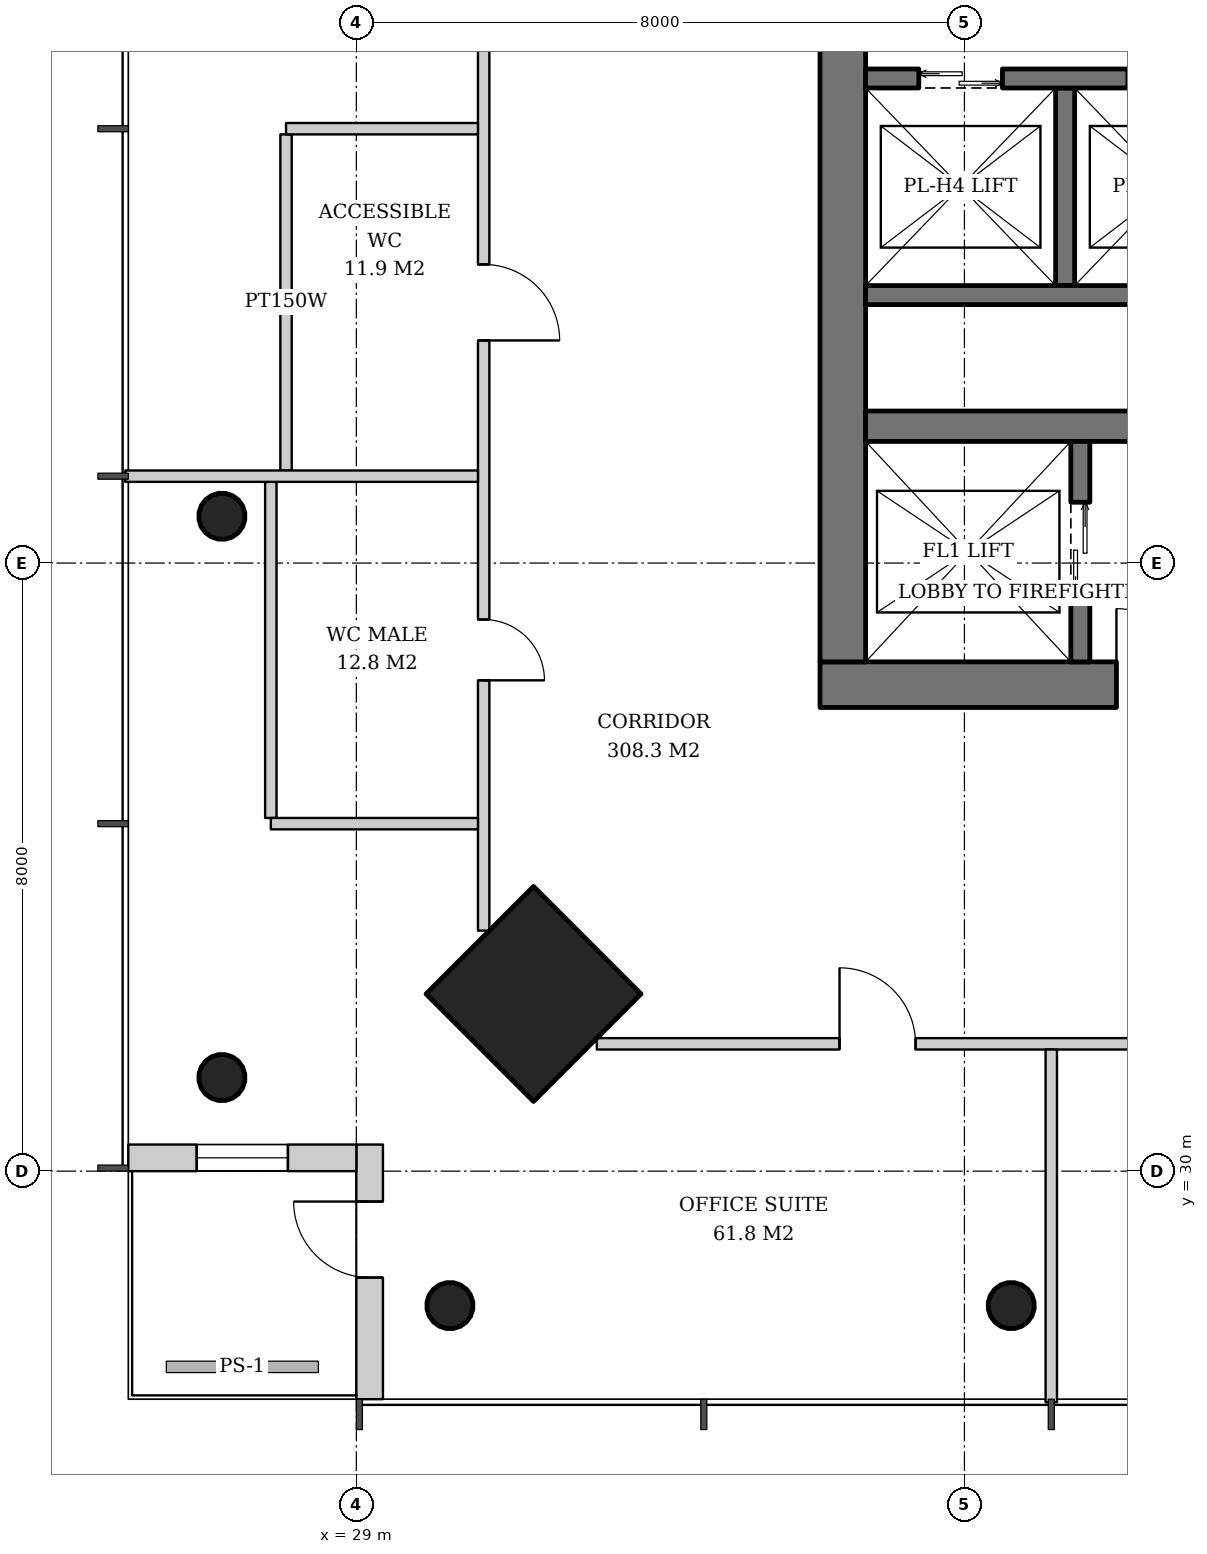
"""IFC4 building model, lengths in metres.
Left out: names, types, materials, properties, quantities, classifications, styles, units other than length and angle.
Written with IfcOpenShell. Run it as: python <this file> out.ifc"""

import sys

from ifc_helpers import new_model, si_unit, direction, frame, frame_2d, origin, origin_2d, place, context, subcontext, project, spatial, rectangle, hollow_circle, extrude, element, fill, save


model = new_model("IFC4")
c1 = context("Model", 3, precision=1e-05, world=origin(), true_north=direction((0.0, 1.0)))
c2 = subcontext(c1, "Body", "Model", "MODEL_VIEW")
j1 = project(units=[si_unit("LENGTHUNIT", "METRE"), si_unit("PLANEANGLEUNIT", "RADIAN")], contexts=[c1])
p1 = place(None, origin())
s1 = spatial("IfcSite", under=j1, at=p1, CompositionType="ELEMENT")
p2 = place(p1, origin())
s2 = spatial("IfcBuilding", under=s1, at=p2, CompositionType="ELEMENT")
p3 = place(p2, frame((0.0, 0.0, 214.8)))
s3 = spatial("IfcBuildingStorey", under=s2, at=p3, CompositionType="ELEMENT", Elevation=214.8)
p4 = place(p3, frame((31.293, 32.293, 0.0), z_axis=(0.031898107953, 0.031898107953, 0.998981992539), x_axis=(-0.707106781187, 0.707106781187, 0.0)))
e1 = element("IfcColumn", 1, at=p4, inside=s3, PredefinedType="COLUMN", context=c2, shape_type="SweptSolid", body=[
    extrude(rectangle(XDim=2.0, YDim=2.0, at=origin_2d()), origin(), (0.0, 0.0, 1.0), 3.804),
])
p5 = place(p3, frame((27.193, 31.193, 0.0), z_axis=(0.031898107953, 0.031898107953, 0.998981992539), x_axis=(-0.707106781187, 0.707106781187, 0.0)))
e2 = element("IfcColumn", 2, at=p5, inside=s3, PredefinedType="COLUMN", context=c2, shape_type="SweptSolid", body=[
    extrude(hollow_circle(Radius=0.305, WallThickness=0.025, at=origin_2d()), origin(), (0.0, 0.0, 1.0), 3.804),
])
p6 = place(p3, frame((27.193, 38.596, 0.0), z_axis=(0.031910269556, 0.015987237665, 0.999362868496), x_axis=(-0.447933021895, 0.894067115991, 0.0)))
e3 = element("IfcColumn", 3, at=p6, inside=s3, PredefinedType="COLUMN", context=c2, shape_type="SweptSolid", body=[
    extrude(hollow_circle(Radius=0.305, WallThickness=0.025, at=origin_2d()), origin(), (0.0, 0.0, 1.0), 3.802),
])
p7 = place(p3, frame((30.193, 28.193, 0.0), z_axis=(0.031898107953, 0.031898107953, 0.998981992539), x_axis=(-0.707106781187, 0.707106781187, 0.0)))
e4 = element("IfcColumn", 4, at=p7, inside=s3, PredefinedType="COLUMN", context=c2, shape_type="SweptSolid", body=[
    extrude(hollow_circle(Radius=0.305, WallThickness=0.025, at=origin_2d()), origin(), (0.0, 0.0, 1.0), 3.804),
])
p8 = place(p3, frame((37.596, 28.193, 0.0), z_axis=(0.015987237665, 0.031910269556, 0.999362868496), x_axis=(-0.894067115991, 0.447933021895, 0.0)))
e5 = element("IfcColumn", 5, at=p8, inside=s3, PredefinedType="COLUMN", context=c2, shape_type="SweptSolid", body=[
    extrude(hollow_circle(Radius=0.305, WallThickness=0.025, at=origin_2d()), origin(), (0.0, 0.0, 1.0), 3.802),
])
p9 = place(p3, frame((35.1, 36.4, 0.0), z_axis=(0.0, 0.0, 1.0), x_axis=(1.0, 0.0, 0.0)))
e6 = element("IfcWall", 6, at=p9, inside=s3, PredefinedType="SHEAR", context=c2, shape_type="SweptSolid", body=[
    extrude(rectangle(XDim=19.8, YDim=0.6, at=frame_2d((9.9, 0.0))), origin(), (0.0, 0.0, 1.0), 3.8),
])
p10 = place(p9, frame((3.9, 0.0, 0.0)))
e7 = element("IfcOpeningElement", 7, at=p10, cuts=e6, PredefinedType="OPENING", context=c2, shape_type="SweptSolid", body=[
    extrude(rectangle(XDim=1.0, YDim=2.1, at=frame_2d((0.5, 1.05))), frame((0.0, 0.31, 0.0), z_axis=(0.0, -1.0, 0.0), x_axis=(1.0, 0.0, 0.0)), (0.0, 0.0, 1.0), 0.62),
])
p11 = place(p9, frame((15.35, 0.0, 0.0)))
e8 = element("IfcOpeningElement", 8, at=p11, cuts=e6, PredefinedType="OPENING", context=c2, shape_type="SweptSolid", body=[
    extrude(rectangle(XDim=1.0, YDim=2.1, at=frame_2d((0.5, 1.05))), frame((0.0, 0.31, 0.0), z_axis=(0.0, -1.0, 0.0), x_axis=(1.0, 0.0, 0.0)), (0.0, 0.0, 1.0), 0.62),
])
p12 = place(p3, frame((35.4, 36.7, 0.0), z_axis=(0.0, 0.0, 1.0), x_axis=(0.0, 1.0, 0.0)))
e9 = element("IfcWall", 9, at=p12, inside=s3, PredefinedType="SHEAR", context=c2, shape_type="SweptSolid", body=[
    extrude(rectangle(XDim=18.6, YDim=0.6, at=frame_2d((9.3, 0.0))), origin(), (0.0, 0.0, 1.0), 3.8),
])
p13 = place(p12, frame((8.4, 0.0, 0.0)))
e10 = element("IfcOpeningElement", 10, at=p13, cuts=e9, PredefinedType="OPENING", context=c2, shape_type="SweptSolid", body=[
    extrude(rectangle(XDim=1.8, YDim=2.4, at=frame_2d((0.9, 1.2))), frame((0.0, 0.31, 0.0), z_axis=(0.0, -1.0, 0.0), x_axis=(1.0, 0.0, 0.0)), (0.0, 0.0, 1.0), 0.62),
])
p14 = place(p3, frame((35.7, 39.8, 0.0), z_axis=(0.0, 0.0, 1.0), x_axis=(1.0, 0.0, 0.0)))
e11 = element("IfcWall", 11, at=p14, inside=s3, PredefinedType="SHEAR", context=c2, shape_type="SweptSolid", body=[
    extrude(rectangle(XDim=18.6, YDim=0.4, at=frame_2d((9.3, 0.0))), origin(), (0.0, 0.0, 1.0), 3.8),
])
p15 = place(p3, frame((29.175, 27.0, 0.0), z_axis=(0.0, 0.0, 1.0), x_axis=(0.0, 1.0, 0.0)))
e12 = element("IfcWall", 12, at=p15, inside=s3, PredefinedType="SOLIDWALL", context=c2, shape_type="SweptSolid", body=[
    extrude(rectangle(XDim=3.35, YDim=0.35, at=frame_2d((1.675, 0.0))), origin(), (0.0, 0.0, 1.0), 3.62),
])
p16 = place(p15, frame((1.6, 0.0, 0.0)))
e13 = element("IfcOpeningElement", 13, at=p16, cuts=e12, PredefinedType="OPENING", context=c2, shape_type="SweptSolid", body=[
    extrude(rectangle(XDim=1.0, YDim=2.4, at=frame_2d((0.5, 1.2))), frame((0.0, 0.185, 0.0), z_axis=(0.0, -1.0, 0.0), x_axis=(1.0, 0.0, 0.0)), (0.0, 0.0, 1.0), 0.37),
])
p17 = place(p3, frame((29.0, 30.175, 0.0), z_axis=(0.0, 0.0, 1.0), x_axis=(-1.0, 0.0, 0.0)))
e14 = element("IfcWall", 14, at=p17, inside=s3, PredefinedType="SOLIDWALL", context=c2, shape_type="SweptSolid", body=[
    extrude(rectangle(XDim=3.0, YDim=0.35, at=frame_2d((1.5, 0.0))), origin(), (0.0, 0.0, 1.0), 3.62),
])
p18 = place(p17, frame((0.9, 0.0, 0.6)))
e15 = element("IfcOpeningElement", 15, at=p18, cuts=e14, PredefinedType="OPENING", context=c2, shape_type="SweptSolid", body=[
    extrude(rectangle(XDim=1.2, YDim=2.55, at=frame_2d((0.6, 1.275))), frame((0.0, 0.185, 0.0), z_axis=(0.0, -1.0, 0.0), x_axis=(1.0, 0.0, 0.0)), (0.0, 0.0, 1.0), 0.37),
])
p19 = place(p3, frame((38.525, 36.7, 0.0), z_axis=(0.0, 0.0, 1.0), x_axis=(0.0, 1.0, 0.0)))
e16 = element("IfcWall", 16, at=p19, inside=s3, PredefinedType="SHEAR", context=c2, shape_type="SweptSolid", body=[
    extrude(rectangle(XDim=2.9, YDim=0.25, at=frame_2d((1.45, 0.0))), origin(), (0.0, 0.0, 1.0), 3.8),
])
p20 = place(p19, frame((0.8, 0.0, 0.0)))
e17 = element("IfcOpeningElement", 17, at=p20, cuts=e16, PredefinedType="OPENING", context=c2, shape_type="SweptSolid", body=[
    extrude(rectangle(XDim=1.3, YDim=2.2, at=frame_2d((0.65, 1.1))), frame((0.0, 0.135, 0.0), z_axis=(0.0, -1.0, 0.0), x_axis=(1.0, 0.0, 0.0)), (0.0, 0.0, 1.0), 0.27),
])
p21 = place(p3, frame((38.325, 44.25, 0.0), z_axis=(0.0, 0.0, 1.0), x_axis=(0.0, -1.0, 0.0)))
e18 = element("IfcWall", 18, at=p21, inside=s3, PredefinedType="SHEAR", context=c2, shape_type="SweptSolid", body=[
    extrude(rectangle(XDim=2.6, YDim=0.25, at=frame_2d((1.3, 0.0))), origin(), (0.0, 0.0, 1.0), 3.8),
])
p22 = place(p3, frame((35.7, 41.525, 0.0), z_axis=(0.0, 0.0, 1.0), x_axis=(1.0, 0.0, 0.0)))
e19 = element("IfcWall", 19, at=p22, inside=s3, PredefinedType="SHEAR", context=c2, shape_type="SweptSolid", body=[
    extrude(rectangle(XDim=11.0, YDim=0.25, at=frame_2d((5.5, 0.0))), origin(), (0.0, 0.0, 1.0), 3.8),
])
p23 = place(p3, frame((35.7, 44.375, 0.0), z_axis=(0.0, 0.0, 1.0), x_axis=(1.0, 0.0, 0.0)))
e20 = element("IfcWall", 20, at=p23, inside=s3, PredefinedType="SHEAR", context=c2, shape_type="SweptSolid", body=[
    extrude(rectangle(XDim=12.83, YDim=0.25, at=frame_2d((6.415, 0.0))), origin(), (0.0, 0.0, 1.0), 3.8),
])
p24 = place(p23, frame((0.7, 0.0, 0.0)))
e21 = element("IfcOpeningElement", 21, at=p24, cuts=e20, PredefinedType="OPENING", context=c2, shape_type="SweptSolid", body=[
    extrude(rectangle(XDim=1.1, YDim=2.2, at=frame_2d((0.55, 1.1))), frame((0.0, 0.135, 0.0), z_axis=(0.0, -1.0, 0.0), x_axis=(1.0, 0.0, 0.0)), (0.0, 0.0, 1.0), 0.27),
])
p25 = place(p23, frame((3.45, 0.0, 0.0)))
e22 = element("IfcOpeningElement", 22, at=p25, cuts=e20, PredefinedType="OPENING", context=c2, shape_type="SweptSolid", body=[
    extrude(rectangle(XDim=1.1, YDim=2.2, at=frame_2d((0.55, 1.1))), frame((0.0, 0.135, 0.0), z_axis=(0.0, -1.0, 0.0), x_axis=(1.0, 0.0, 0.0)), (0.0, 0.0, 1.0), 0.27),
])
p26 = place(p23, frame((6.2, 0.0, 0.0)))
e23 = element("IfcOpeningElement", 23, at=p26, cuts=e20, PredefinedType="OPENING", context=c2, shape_type="SweptSolid", body=[
    extrude(rectangle(XDim=1.1, YDim=2.2, at=frame_2d((0.55, 1.1))), frame((0.0, 0.135, 0.0), z_axis=(0.0, -1.0, 0.0), x_axis=(1.0, 0.0, 0.0)), (0.0, 0.0, 1.0), 0.27),
])
p27 = place(p23, frame((9.0, 0.0, 0.0)))
e24 = element("IfcOpeningElement", 24, at=p27, cuts=e20, PredefinedType="OPENING", context=c2, shape_type="SweptSolid", body=[
    extrude(rectangle(XDim=1.0, YDim=2.1, at=frame_2d((0.5, 1.05))), frame((0.0, 0.135, 0.0), z_axis=(0.0, -1.0, 0.0), x_axis=(1.0, 0.0, 0.0)), (0.0, 0.0, 1.0), 0.27),
])
p28 = place(p23, frame((11.515, 0.0, 0.0)))
e25 = element("IfcOpeningElement", 25, at=p28, cuts=e20, PredefinedType="OPENING", context=c2, shape_type="SweptSolid", body=[
    extrude(rectangle(XDim=0.8, YDim=2.0, at=frame_2d((0.4, 1.0))), frame((0.0, 0.135, 0.0), z_axis=(0.0, -1.0, 0.0), x_axis=(1.0, 0.0, 0.0)), (0.0, 0.0, 1.0), 0.27),
])
p29 = place(p3, frame((28.075, 43.639, 0.0), z_axis=(0.0, 0.0, 1.0), x_axis=(0.0, -1.0, 0.0)))
e26 = element("IfcWall", 26, at=p29, inside=s3, PredefinedType="PARTITIONING", context=c2, shape_type="SweptSolid", body=[
    extrude(rectangle(XDim=4.422, YDim=0.15, at=frame_2d((2.211, 0.0))), origin(), (0.0, 0.0, 1.0), 2.867),
])
p30 = place(p3, frame((27.875, 39.068, 0.0), z_axis=(0.0, 0.0, 1.0), x_axis=(0.0, -1.0, 0.0)))
e27 = element("IfcWall", 27, at=p30, inside=s3, PredefinedType="PARTITIONING", context=c2, shape_type="SweptSolid", body=[
    extrude(rectangle(XDim=4.421, YDim=0.15, at=frame_2d((2.211, 0.0))), origin(), (0.0, 0.0, 1.0), 2.867),
])
p31 = place(p3, frame((30.675, 58.836, 0.0), z_axis=(0.0, 0.0, 1.0), x_axis=(0.0, -1.0, 0.0)))
e28 = element("IfcWall", 28, at=p31, inside=s3, PredefinedType="PARTITIONING", context=c2, shape_type="SweptSolid", body=[
    extrude(rectangle(XDim=25.671, YDim=0.15, at=frame_2d((12.836, 0.0))), origin(), (0.0, 0.0, 1.0), 2.867),
])
p32 = place(p31, frame((3.193, 0.0, 0.0)))
e29 = element("IfcOpeningElement", 29, at=p32, cuts=e28, PredefinedType="OPENING", context=c2, shape_type="SweptSolid", body=[
    extrude(rectangle(XDim=1.0, YDim=2.1, at=frame_2d((0.5, 1.05))), frame((0.0, 0.085, 0.0), z_axis=(0.0, -1.0, 0.0), x_axis=(1.0, 0.0, 0.0)), (0.0, 0.0, 1.0), 0.17),
])
p33 = place(p31, frame((7.364, 0.0, 0.0)))
e30 = element("IfcOpeningElement", 30, at=p33, cuts=e28, PredefinedType="OPENING", context=c2, shape_type="SweptSolid", body=[
    extrude(rectangle(XDim=1.8, YDim=2.4, at=frame_2d((0.9, 1.2))), frame((0.0, 0.085, 0.0), z_axis=(0.0, -1.0, 0.0), x_axis=(1.0, 0.0, 0.0)), (0.0, 0.0, 1.0), 0.17),
])
p34 = place(p31, frame((12.436, 0.0, 0.0)))
e31 = element("IfcOpeningElement", 31, at=p34, cuts=e28, PredefinedType="OPENING", context=c2, shape_type="SweptSolid", body=[
    extrude(rectangle(XDim=0.8, YDim=2.1, at=frame_2d((0.4, 1.05))), frame((0.0, 0.085, 0.0), z_axis=(0.0, -1.0, 0.0), x_axis=(1.0, 0.0, 0.0)), (0.0, 0.0, 1.0), 0.17),
])
p35 = place(p31, frame((16.907, 0.0, 0.0)))
e32 = element("IfcOpeningElement", 32, at=p35, cuts=e28, PredefinedType="OPENING", context=c2, shape_type="SweptSolid", body=[
    extrude(rectangle(XDim=1.0, YDim=2.1, at=frame_2d((0.5, 1.05))), frame((0.0, 0.085, 0.0), z_axis=(0.0, -1.0, 0.0), x_axis=(1.0, 0.0, 0.0)), (0.0, 0.0, 1.0), 0.17),
])
p36 = place(p31, frame((21.579, 0.0, 0.0)))
e33 = element("IfcOpeningElement", 33, at=p36, cuts=e28, PredefinedType="OPENING", context=c2, shape_type="SweptSolid", body=[
    extrude(rectangle(XDim=0.8, YDim=2.1, at=frame_2d((0.4, 1.05))), frame((0.0, 0.085, 0.0), z_axis=(0.0, -1.0, 0.0), x_axis=(1.0, 0.0, 0.0)), (0.0, 0.0, 1.0), 0.17),
])
p37 = place(p3, frame((30.6, 43.714, 0.0), z_axis=(0.0, 0.0, 1.0), x_axis=(-1.0, 0.0, 0.0)))
e34 = element("IfcWall", 34, at=p37, inside=s3, PredefinedType="PARTITIONING", context=c2, shape_type="SweptSolid", body=[
    extrude(rectangle(XDim=2.525, YDim=0.15, at=frame_2d((1.263, 0.0))), origin(), (0.0, 0.0, 1.0), 3.62),
])
p38 = place(p3, frame((30.6, 39.143, 0.0), z_axis=(0.0, 0.0, 1.0), x_axis=(-1.0, 0.0, 0.0)))
e35 = element("IfcWall", 35, at=p38, inside=s3, PredefinedType="PARTITIONING", context=c2, shape_type="SweptSolid", body=[
    extrude(rectangle(XDim=4.64, YDim=0.15, at=frame_2d((2.32, 0.0))), origin(), (0.0, 0.0, 1.0), 3.12),
])
p39 = place(p3, frame((30.6, 34.572, 0.0), z_axis=(0.0, 0.0, 1.0), x_axis=(-1.0, 0.0, 0.0)))
e36 = element("IfcWall", 36, at=p39, inside=s3, PredefinedType="PARTITIONING", context=c2, shape_type="SweptSolid", body=[
    extrude(rectangle(XDim=2.725, YDim=0.15, at=frame_2d((1.363, 0.0))), origin(), (0.0, 0.0, 1.0), 3.62),
])
p40 = place(p3, frame((32.164, 31.675, 0.0), z_axis=(0.0, 0.0, 1.0), x_axis=(1.0, 0.0, 0.0)))
e37 = element("IfcWall", 37, at=p40, inside=s3, PredefinedType="PARTITIONING", context=c2, shape_type="SweptSolid", body=[
    extrude(rectangle(XDim=25.671, YDim=0.15, at=frame_2d((12.836, 0.0))), origin(), (0.0, 0.0, 1.0), 2.867),
])
p41 = place(p40, frame((3.193, 0.0, 0.0)))
e38 = element("IfcOpeningElement", 38, at=p41, cuts=e37, PredefinedType="OPENING", context=c2, shape_type="SweptSolid", body=[
    extrude(rectangle(XDim=1.0, YDim=2.1, at=frame_2d((0.5, 1.05))), frame((0.0, 0.085, 0.0), z_axis=(0.0, -1.0, 0.0), x_axis=(1.0, 0.0, 0.0)), (0.0, 0.0, 1.0), 0.17),
])
p42 = place(p40, frame((7.764, 0.0, 0.0)))
e39 = element("IfcOpeningElement", 39, at=p42, cuts=e37, PredefinedType="OPENING", context=c2, shape_type="SweptSolid", body=[
    extrude(rectangle(XDim=1.0, YDim=2.1, at=frame_2d((0.5, 1.05))), frame((0.0, 0.085, 0.0), z_axis=(0.0, -1.0, 0.0), x_axis=(1.0, 0.0, 0.0)), (0.0, 0.0, 1.0), 0.17),
])
p43 = place(p40, frame((12.336, 0.0, 0.0)))
e40 = element("IfcOpeningElement", 40, at=p43, cuts=e37, PredefinedType="OPENING", context=c2, shape_type="SweptSolid", body=[
    extrude(rectangle(XDim=1.0, YDim=2.1, at=frame_2d((0.5, 1.05))), frame((0.0, 0.085, 0.0), z_axis=(0.0, -1.0, 0.0), x_axis=(1.0, 0.0, 0.0)), (0.0, 0.0, 1.0), 0.17),
])
p44 = place(p40, frame((16.907, 0.0, 0.0)))
e41 = element("IfcOpeningElement", 41, at=p44, cuts=e37, PredefinedType="OPENING", context=c2, shape_type="SweptSolid", body=[
    extrude(rectangle(XDim=1.0, YDim=2.1, at=frame_2d((0.5, 1.05))), frame((0.0, 0.085, 0.0), z_axis=(0.0, -1.0, 0.0), x_axis=(1.0, 0.0, 0.0)), (0.0, 0.0, 1.0), 0.17),
])
p45 = place(p40, frame((21.479, 0.0, 0.0)))
e42 = element("IfcOpeningElement", 42, at=p45, cuts=e37, PredefinedType="OPENING", context=c2, shape_type="SweptSolid", body=[
    extrude(rectangle(XDim=1.0, YDim=2.1, at=frame_2d((0.5, 1.05))), frame((0.0, 0.085, 0.0), z_axis=(0.0, -1.0, 0.0), x_axis=(1.0, 0.0, 0.0)), (0.0, 0.0, 1.0), 0.17),
])
p46 = place(p3, frame((38.143, 31.6, 0.0), z_axis=(0.0, 0.0, 1.0), x_axis=(0.0, -1.0, 0.0)))
e43 = element("IfcWall", 43, at=p46, inside=s3, PredefinedType="PARTITIONING", context=c2, shape_type="SweptSolid", body=[
    extrude(rectangle(XDim=4.64, YDim=0.15, at=frame_2d((2.32, 0.0))), origin(), (0.0, 0.0, 1.0), 3.12),
])
p47 = place(p16, origin())
e44 = element("IfcDoor", 44, at=p47, inside=s3, OperationType="SINGLE_SWING_RIGHT", PredefinedType="DOOR", context=c2, shape_type="SweptSolid", body=[
    extrude(rectangle(XDim=1.0, YDim=2.4, at=frame_2d((0.5, 1.2))), frame((0.0, 0.025, 0.0), z_axis=(0.0, -1.0, 0.0), x_axis=(1.0, 0.0, 0.0)), (0.0, 0.0, 1.0), 0.05),
])
fill(e13, e44)
p48 = place(p18, origin())
e45 = element("IfcWindow", 45, at=p48, inside=s3, PartitioningType="SINGLE_PANEL", PredefinedType="WINDOW", context=c2, shape_type="SweptSolid", body=[
    extrude(rectangle(XDim=1.2, YDim=2.55, at=frame_2d((0.6, 1.275))), frame((0.0, 0.03, 0.0), z_axis=(0.0, -1.0, 0.0), x_axis=(1.0, 0.0, 0.0)), (0.0, 0.0, 1.0), 0.06),
])
fill(e15, e45)
p49 = place(p20, origin())
e46 = element("IfcDoor", 46, at=p49, inside=s3, OperationType="DOUBLE_DOOR_SLIDING", PredefinedType="DOOR", context=c2, shape_type="SweptSolid", body=[
    extrude(rectangle(XDim=1.3, YDim=2.2, at=frame_2d((0.65, 1.1))), frame((0.0, 0.025, 0.0), z_axis=(0.0, -1.0, 0.0), x_axis=(1.0, 0.0, 0.0)), (0.0, 0.0, 1.0), 0.05),
])
fill(e17, e46)
p50 = place(p24, origin())
e47 = element("IfcDoor", 47, at=p50, inside=s3, OperationType="DOUBLE_DOOR_SLIDING", PredefinedType="DOOR", context=c2, shape_type="SweptSolid", body=[
    extrude(rectangle(XDim=1.1, YDim=2.2, at=frame_2d((0.55, 1.1))), frame((0.0, 0.025, 0.0), z_axis=(0.0, -1.0, 0.0), x_axis=(1.0, 0.0, 0.0)), (0.0, 0.0, 1.0), 0.05),
])
fill(e21, e47)
p51 = place(p10, origin())
e48 = element("IfcDoor", 48, at=p51, inside=s3, OperationType="SINGLE_SWING_LEFT", PredefinedType="DOOR", context=c2, shape_type="SweptSolid", body=[
    extrude(rectangle(XDim=1.0, YDim=2.1, at=frame_2d((0.5, 1.05))), frame((0.0, 0.025, 0.0), z_axis=(0.0, -1.0, 0.0), x_axis=(1.0, 0.0, 0.0)), (0.0, 0.0, 1.0), 0.05),
])
fill(e7, e48)
p52 = place(p35, origin())
e49 = element("IfcDoor", 49, at=p52, inside=s3, OperationType="SINGLE_SWING_RIGHT", PredefinedType="DOOR", context=c2, shape_type="SweptSolid", body=[
    extrude(rectangle(XDim=1.0, YDim=2.1, at=frame_2d((0.5, 1.05))), frame((0.0, 0.025, 0.0), z_axis=(0.0, -1.0, 0.0), x_axis=(1.0, 0.0, 0.0)), (0.0, 0.0, 1.0), 0.05),
])
fill(e32, e49)
p53 = place(p36, origin())
e50 = element("IfcDoor", 50, at=p53, inside=s3, OperationType="SINGLE_SWING_RIGHT", PredefinedType="DOOR", context=c2, shape_type="SweptSolid", body=[
    extrude(rectangle(XDim=0.8, YDim=2.1, at=frame_2d((0.4, 1.05))), frame((0.0, 0.025, 0.0), z_axis=(0.0, -1.0, 0.0), x_axis=(1.0, 0.0, 0.0)), (0.0, 0.0, 1.0), 0.05),
])
fill(e33, e50)
p54 = place(p41, origin())
e51 = element("IfcDoor", 51, at=p54, inside=s3, OperationType="SINGLE_SWING_LEFT", PredefinedType="DOOR", context=c2, shape_type="SweptSolid", body=[
    extrude(rectangle(XDim=1.0, YDim=2.1, at=frame_2d((0.5, 1.05))), frame((0.0, 0.025, 0.0), z_axis=(0.0, -1.0, 0.0), x_axis=(1.0, 0.0, 0.0)), (0.0, 0.0, 1.0), 0.05),
])
fill(e38, e51)
save(model, sys.argv[1])
